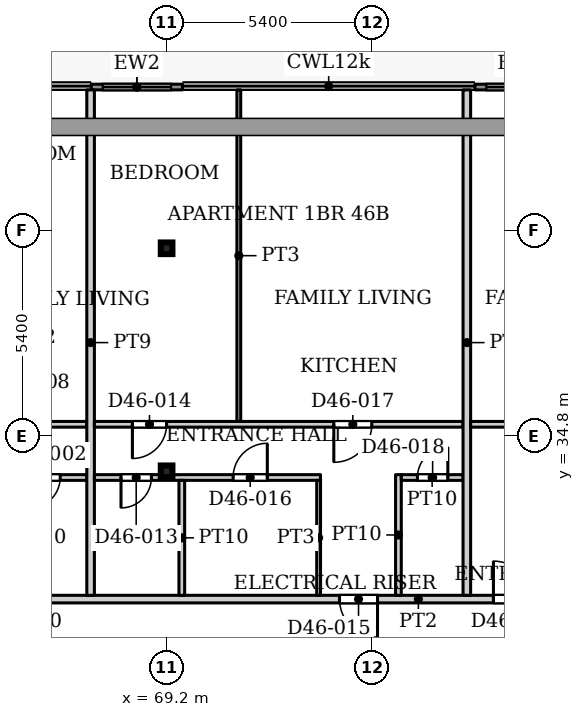
"""IFC4 building model, lengths in metres.
Left out: names, types, materials, properties, quantities, classifications, styles, units other than length and angle.
Written with IfcOpenShell. Run it as: python <this file> out.ifc"""

import sys

from ifc_helpers import new_model, si_unit, direction, frame, frame_2d, origin, origin_2d, place, context, subcontext, project, spatial, rectangle, hollow_rectangle, extrude, source, transform, mapped, element, fill, save


model = new_model("IFC4")
c1 = context("Model", 3, precision=1e-05, world=origin(), true_north=direction((0.0, 1.0)))
c2 = subcontext(c1, "Body", "Model", "MODEL_VIEW")
j1 = project(units=[si_unit("LENGTHUNIT", "METRE"), si_unit("PLANEANGLEUNIT", "RADIAN")], contexts=[c1])
p1 = place(None, origin())
s1 = spatial("IfcSite", under=j1, at=p1, CompositionType="ELEMENT")
p2 = place(p1, origin())
s2 = spatial("IfcBuilding", under=s1, at=p2, CompositionType="ELEMENT")
p3 = place(p2, frame((0.0, 0.0, 195.5)))
s3 = spatial("IfcBuildingStorey", under=s2, at=p3, CompositionType="ELEMENT", Elevation=195.5)
for number, where, z_axis, x_axis in (
    (1, (69.2, 33.863, 0.0), (0.0, 0.0, 1.0), (1.0, 0.0, 0.0)),
    (2, (69.2, 39.732, 0.0), (0.0, 0.0, 1.0), (1.0, 0.0, 0.0)),
):
    element("IfcColumn", number, at=place(p3, frame(where, z_axis=z_axis, x_axis=x_axis)), inside=s3, PredefinedType="COLUMN", context=c2, shape_type="SweptSolid", body=[
        extrude(hollow_rectangle(XDim=0.305, YDim=0.305, WallThickness=0.016, InnerFilletRadius=0.016, OuterFilletRadius=0.032, at=origin_2d()), origin(), (0.0, 0.0, 1.0), 3.9),
    ])
p4 = place(p3, frame((67.218, 43.975, 0.0), z_axis=(0.0, 0.0, 1.0), x_axis=(1.0, 0.0, 0.0)))
e3 = element("IfcWall", 3, at=p4, inside=s3, PredefinedType="SOLIDWALL", context=c2, shape_type="SweptSolid", body=[
    extrude(rectangle(XDim=2.4, YDim=0.15, at=frame_2d((1.2, 0.0))), origin(), (0.0, 0.0, 1.0), 3.75),
])
p5 = place(p4, frame((0.3, 0.0, 0.0)))
e4 = element("IfcOpeningElement", 4, at=p5, cuts=e3, PredefinedType="OPENING", context=c2, shape_type="SweptSolid", body=[
    extrude(rectangle(XDim=1.8, YDim=2.4, at=frame_2d((0.9, 1.2))), frame((0.0, 0.085, 0.0), z_axis=(0.0, -1.0, 0.0), x_axis=(1.0, 0.0, 0.0)), (0.0, 0.0, 1.0), 0.17),
])
p6 = place(p3, frame((77.312, 43.975, 0.0), z_axis=(0.0, 0.0, 1.0), x_axis=(1.0, 0.0, 0.0)))
e5 = element("IfcWall", 5, at=p6, inside=s3, PredefinedType="SOLIDWALL", context=c2, shape_type="SweptSolid", body=[
    extrude(rectangle(XDim=2.4, YDim=0.15, at=frame_2d((1.2, 0.0))), origin(), (0.0, 0.0, 1.0), 3.75),
])
p7 = place(p6, frame((0.3, 0.0, 0.0)))
e6 = element("IfcOpeningElement", 6, at=p7, cuts=e5, PredefinedType="OPENING", context=c2, shape_type="SweptSolid", body=[
    extrude(rectangle(XDim=1.8, YDim=2.4, at=frame_2d((0.9, 1.2))), frame((0.0, 0.085, 0.0), z_axis=(0.0, -1.0, 0.0), x_axis=(1.0, 0.0, 0.0)), (0.0, 0.0, 1.0), 0.17),
])
p8 = place(p3, frame((53.549, 30.5, 0.0), z_axis=(0.0, 0.0, 1.0), x_axis=(1.0, 0.0, 0.0)))
e7 = element("IfcWall", 7, at=p8, inside=s3, PredefinedType="PARTITIONING", context=c2, shape_type="SweptSolid", body=[
    extrude(rectangle(XDim=44.551, YDim=0.2, at=frame_2d((22.275, 0.0))), origin(), (0.0, 0.0, 1.0), 3.6),
])
p9 = place(p8, frame((5.501, 0.0, 0.0)))
e8 = element("IfcOpeningElement", 8, at=p9, cuts=e7, PredefinedType="OPENING", context=c2, shape_type="SweptSolid", body=[
    extrude(rectangle(XDim=1.0, YDim=2.1, at=frame_2d((0.5, 1.05))), frame((0.0, 0.11, 0.0), z_axis=(0.0, -1.0, 0.0), x_axis=(1.0, 0.0, 0.0)), (0.0, 0.0, 1.0), 0.22),
])
p10 = place(p8, frame((20.201, 0.0, 0.0)))
e9 = element("IfcOpeningElement", 9, at=p10, cuts=e7, PredefinedType="OPENING", context=c2, shape_type="SweptSolid", body=[
    extrude(rectangle(XDim=1.0, YDim=2.1, at=frame_2d((0.5, 1.05))), frame((0.0, 0.11, 0.0), z_axis=(0.0, -1.0, 0.0), x_axis=(1.0, 0.0, 0.0)), (0.0, 0.0, 1.0), 0.22),
])
p11 = place(p8, frame((24.251, 0.0, 0.0)))
e10 = element("IfcOpeningElement", 10, at=p11, cuts=e7, PredefinedType="OPENING", context=c2, shape_type="SweptSolid", body=[
    extrude(rectangle(XDim=1.0, YDim=2.1, at=frame_2d((0.5, 1.05))), frame((0.0, 0.11, 0.0), z_axis=(0.0, -1.0, 0.0), x_axis=(1.0, 0.0, 0.0)), (0.0, 0.0, 1.0), 0.22),
])
p12 = place(p8, frame((40.151, 0.0, 0.0)))
e11 = element("IfcOpeningElement", 11, at=p12, cuts=e7, PredefinedType="OPENING", context=c2, shape_type="SweptSolid", body=[
    extrude(rectangle(XDim=1.0, YDim=2.1, at=frame_2d((0.5, 1.05))), frame((0.0, 0.11, 0.0), z_axis=(0.0, -1.0, 0.0), x_axis=(1.0, 0.0, 0.0)), (0.0, 0.0, 1.0), 0.22),
])
p13 = place(p3, frame((53.549, 35.1, 0.0), z_axis=(0.0, 0.0, 1.0), x_axis=(1.0, 0.0, 0.0)))
e12 = element("IfcWall", 12, at=p13, inside=s3, PredefinedType="PARTITIONING", context=c2, shape_type="SweptSolid", body=[
    extrude(rectangle(XDim=13.551, YDim=0.15, at=frame_2d((6.775, 0.0))), origin(), (0.0, 0.0, 1.0), 3.6),
])
p14 = place(p13, frame((3.901, 0.0, 0.0)))
e13 = element("IfcOpeningElement", 13, at=p14, cuts=e12, PredefinedType="OPENING", context=c2, shape_type="SweptSolid", body=[
    extrude(rectangle(XDim=0.9, YDim=2.1, at=frame_2d((0.45, 1.05))), frame((0.0, 0.085, 0.0), z_axis=(0.0, -1.0, 0.0), x_axis=(1.0, 0.0, 0.0)), (0.0, 0.0, 1.0), 0.17),
])
p15 = place(p13, frame((8.701, 0.0, 0.0)))
e14 = element("IfcOpeningElement", 14, at=p15, cuts=e12, PredefinedType="OPENING", context=c2, shape_type="SweptSolid", body=[
    extrude(rectangle(XDim=0.9, YDim=2.1, at=frame_2d((0.45, 1.05))), frame((0.0, 0.085, 0.0), z_axis=(0.0, -1.0, 0.0), x_axis=(1.0, 0.0, 0.0)), (0.0, 0.0, 1.0), 0.17),
])
p16 = place(p13, frame((11.501, 0.0, 0.0)))
e15 = element("IfcOpeningElement", 15, at=p16, cuts=e12, PredefinedType="OPENING", context=c2, shape_type="SweptSolid", body=[
    extrude(rectangle(XDim=1.0, YDim=2.1, at=frame_2d((0.5, 1.05))), frame((0.0, 0.085, 0.0), z_axis=(0.0, -1.0, 0.0), x_axis=(1.0, 0.0, 0.0)), (0.0, 0.0, 1.0), 0.17),
])
p17 = place(p13, frame((6.301, 0.0, 0.0)))
e16 = element("IfcOpeningElement", 16, at=p17, cuts=e12, PredefinedType="OPENING", context=c2, shape_type="SweptSolid", body=[
    extrude(rectangle(XDim=0.9, YDim=2.1, at=frame_2d((0.45, 1.05))), frame((0.0, 0.085, 0.0), z_axis=(0.0, -1.0, 0.0), x_axis=(1.0, 0.0, 0.0)), (0.0, 0.0, 1.0), 0.17),
])
p18 = place(p13, frame((0.15, 0.0, 0.0)))
e17 = element("IfcOpeningElement", 17, at=p18, cuts=e12, PredefinedType="OPENING", context=c2, shape_type="SweptSolid", body=[
    extrude(rectangle(XDim=0.7, YDim=2.1, at=frame_2d((0.35, 1.05))), frame((0.0, 0.085, 0.0), z_axis=(0.0, -1.0, 0.0), x_axis=(1.0, 0.0, 0.0)), (0.0, 0.0, 1.0), 0.17),
])
p19 = place(p3, frame((60.525, 33.7, 0.0), z_axis=(0.0, 0.0, 1.0), x_axis=(1.0, 0.0, 0.0)))
e18 = element("IfcWall", 18, at=p19, inside=s3, PredefinedType="PARTITIONING", context=c2, shape_type="SweptSolid", body=[
    extrude(rectangle(XDim=6.575, YDim=0.15, at=frame_2d((3.288, 0.0))), origin(), (0.0, 0.0, 1.0), 3.6),
])
p20 = place(p19, frame((2.675, 0.0, 0.0)))
e19 = element("IfcOpeningElement", 19, at=p20, cuts=e18, PredefinedType="OPENING", context=c2, shape_type="SweptSolid", body=[
    extrude(rectangle(XDim=0.8, YDim=2.1, at=frame_2d((0.4, 1.05))), frame((0.0, 0.085, 0.0), z_axis=(0.0, -1.0, 0.0), x_axis=(1.0, 0.0, 0.0)), (0.0, 0.0, 1.0), 0.17),
])
p21 = place(p19, frame((5.075, 0.0, 0.0)))
e20 = element("IfcOpeningElement", 20, at=p21, cuts=e18, PredefinedType="OPENING", context=c2, shape_type="SweptSolid", body=[
    extrude(rectangle(XDim=0.8, YDim=2.1, at=frame_2d((0.4, 1.05))), frame((0.0, 0.085, 0.0), z_axis=(0.0, -1.0, 0.0), x_axis=(1.0, 0.0, 0.0)), (0.0, 0.0, 1.0), 0.17),
])
p22 = place(p19, frame((0.575, 0.0, 0.0)))
e21 = element("IfcOpeningElement", 21, at=p22, cuts=e18, PredefinedType="OPENING", context=c2, shape_type="SweptSolid", body=[
    extrude(rectangle(XDim=0.8, YDim=2.1, at=frame_2d((0.4, 1.05))), frame((0.0, 0.085, 0.0), z_axis=(0.0, -1.0, 0.0), x_axis=(1.0, 0.0, 0.0)), (0.0, 0.0, 1.0), 0.17),
])
p23 = place(p3, frame((67.2, 30.6, 0.0), z_axis=(0.0, 0.0, 1.0), x_axis=(0.0, 1.0, 0.0)))
e22 = element("IfcWall", 22, at=p23, inside=s3, PredefinedType="PARTITIONING", context=c2, shape_type="SweptSolid", body=[
    extrude(rectangle(XDim=13.3, YDim=0.2, at=frame_2d((6.65, 0.0))), origin(), (0.0, 0.0, 1.0), 3.6),
])
p24 = place(p3, frame((67.3, 33.7, 0.0), z_axis=(0.0, 0.0, 1.0), x_axis=(1.0, 0.0, 0.0)))
e23 = element("IfcWall", 23, at=p24, inside=s3, PredefinedType="PARTITIONING", context=c2, shape_type="SweptSolid", body=[
    extrude(rectangle(XDim=5.95, YDim=0.15, at=frame_2d((2.975, 0.0))), origin(), (0.0, 0.0, 1.0), 3.6),
])
p25 = place(p24, frame((0.7, 0.0, 0.0)))
e24 = element("IfcOpeningElement", 24, at=p25, cuts=e23, PredefinedType="OPENING", context=c2, shape_type="SweptSolid", body=[
    extrude(rectangle(XDim=0.8, YDim=2.1, at=frame_2d((0.4, 1.05))), frame((0.0, 0.085, 0.0), z_axis=(0.0, -1.0, 0.0), x_axis=(1.0, 0.0, 0.0)), (0.0, 0.0, 1.0), 0.17),
])
p26 = place(p24, frame((3.65, 0.0, 0.0)))
e25 = element("IfcOpeningElement", 25, at=p26, cuts=e23, PredefinedType="OPENING", context=c2, shape_type="SweptSolid", body=[
    extrude(rectangle(XDim=0.9, YDim=2.1, at=frame_2d((0.45, 1.05))), frame((0.0, 0.085, 0.0), z_axis=(0.0, -1.0, 0.0), x_axis=(1.0, 0.0, 0.0)), (0.0, 0.0, 1.0), 0.17),
])
p27 = place(p3, frame((67.3, 35.1, 0.0), z_axis=(0.0, 0.0, 1.0), x_axis=(1.0, 0.0, 0.0)))
e26 = element("IfcWall", 26, at=p27, inside=s3, PredefinedType="PARTITIONING", context=c2, shape_type="SweptSolid", body=[
    extrude(rectangle(XDim=9.7, YDim=0.15, at=frame_2d((4.85, 0.0))), origin(), (0.0, 0.0, 1.0), 3.6),
])
p28 = place(p27, frame((1.0, 0.0, 0.0)))
e27 = element("IfcOpeningElement", 27, at=p28, cuts=e26, PredefinedType="OPENING", context=c2, shape_type="SweptSolid", body=[
    extrude(rectangle(XDim=0.9, YDim=2.1, at=frame_2d((0.45, 1.05))), frame((0.0, 0.085, 0.0), z_axis=(0.0, -1.0, 0.0), x_axis=(1.0, 0.0, 0.0)), (0.0, 0.0, 1.0), 0.17),
])
p29 = place(p27, frame((6.3, 0.0, 0.0)))
e28 = element("IfcOpeningElement", 28, at=p29, cuts=e26, PredefinedType="OPENING", context=c2, shape_type="SweptSolid", body=[
    extrude(rectangle(XDim=1.0, YDim=2.1, at=frame_2d((0.5, 1.05))), frame((0.0, 0.085, 0.0), z_axis=(0.0, -1.0, 0.0), x_axis=(1.0, 0.0, 0.0)), (0.0, 0.0, 1.0), 0.17),
])
p30 = place(p3, frame((69.6, 30.6, 0.0), z_axis=(0.0, 0.0, 1.0), x_axis=(0.0, 1.0, 0.0)))
e29 = element("IfcWall", 29, at=p30, inside=s3, PredefinedType="PARTITIONING", context=c2, shape_type="SweptSolid", body=[
    extrude(rectangle(XDim=3.025, YDim=0.15, at=frame_2d((1.512, 0.0))), origin(), (0.0, 0.0, 1.0), 3.6),
])
p31 = place(p3, frame((71.1, 35.175, 0.0), z_axis=(0.0, 0.0, 1.0), x_axis=(0.0, 1.0, 0.0)))
e30 = element("IfcWall", 30, at=p31, inside=s3, PredefinedType="PARTITIONING", context=c2, shape_type="SweptSolid", body=[
    extrude(rectangle(XDim=8.725, YDim=0.1, at=frame_2d((4.362, 0.0))), origin(), (0.0, 0.0, 1.0), 3.6),
])
p32 = place(p3, frame((73.2, 30.6, 0.0), z_axis=(0.0, 0.0, 1.0), x_axis=(0.0, 1.0, 0.0)))
e31 = element("IfcWall", 31, at=p32, inside=s3, PredefinedType="PARTITIONING", context=c2, shape_type="SweptSolid", body=[
    extrude(rectangle(XDim=3.025, YDim=0.1, at=frame_2d((1.512, 0.0))), origin(), (0.0, 0.0, 1.0), 3.6),
])
p33 = place(p3, frame((75.3, 30.6, 0.0), z_axis=(0.0, 0.0, 1.0), x_axis=(0.0, 1.0, 0.0)))
e32 = element("IfcWall", 32, at=p33, inside=s3, PredefinedType="PARTITIONING", context=c2, shape_type="SweptSolid", body=[
    extrude(rectangle(XDim=3.175, YDim=0.15, at=frame_2d((1.587, 0.0))), origin(), (0.0, 0.0, 1.0), 3.6),
])
p34 = place(p3, frame((75.375, 33.7, 0.0), z_axis=(0.0, 0.0, 1.0), x_axis=(1.0, 0.0, 0.0)))
e33 = element("IfcWall", 33, at=p34, inside=s3, PredefinedType="PARTITIONING", context=c2, shape_type="SweptSolid", body=[
    extrude(rectangle(XDim=1.625, YDim=0.15, at=frame_2d((0.812, 0.0))), origin(), (0.0, 0.0, 1.0), 3.6),
])
p35 = place(p34, frame((0.425, 0.0, 0.0)))
e34 = element("IfcOpeningElement", 34, at=p35, cuts=e33, PredefinedType="OPENING", context=c2, shape_type="SweptSolid", body=[
    extrude(rectangle(XDim=0.8, YDim=2.1, at=frame_2d((0.4, 1.05))), frame((0.0, 0.085, 0.0), z_axis=(0.0, -1.0, 0.0), x_axis=(1.0, 0.0, 0.0)), (0.0, 0.0, 1.0), 0.17),
])
p36 = place(p3, frame((77.1, 30.6, 0.0), z_axis=(0.0, 0.0, 1.0), x_axis=(0.0, 1.0, 0.0)))
e35 = element("IfcWall", 35, at=p36, inside=s3, PredefinedType="PARTITIONING", context=c2, shape_type="SweptSolid", body=[
    extrude(rectangle(XDim=13.3, YDim=0.2, at=frame_2d((6.65, 0.0))), origin(), (0.0, 0.0, 1.0), 3.6),
])
p37 = place(p3, frame((77.2, 35.1, 0.0), z_axis=(0.0, 0.0, 1.0), x_axis=(1.0, 0.0, 0.0)))
e36 = element("IfcWall", 36, at=p37, inside=s3, PredefinedType="PARTITIONING", context=c2, shape_type="SweptSolid", body=[
    extrude(rectangle(XDim=11.8, YDim=0.15, at=frame_2d((5.9, 0.0))), origin(), (0.0, 0.0, 1.0), 3.6),
])
p38 = place(p37, frame((6.2, 0.0, 0.0)))
e37 = element("IfcOpeningElement", 37, at=p38, cuts=e36, PredefinedType="OPENING", context=c2, shape_type="SweptSolid", body=[
    extrude(rectangle(XDim=0.9, YDim=2.1, at=frame_2d((0.45, 1.05))), frame((0.0, 0.085, 0.0), z_axis=(0.0, -1.0, 0.0), x_axis=(1.0, 0.0, 0.0)), (0.0, 0.0, 1.0), 0.17),
])
p39 = place(p37, frame((1.95, 0.0, 0.0)))
e38 = element("IfcOpeningElement", 38, at=p39, cuts=e36, PredefinedType="OPENING", context=c2, shape_type="SweptSolid", body=[
    extrude(rectangle(XDim=1.0, YDim=2.1, at=frame_2d((0.5, 1.05))), frame((0.0, 0.085, 0.0), z_axis=(0.0, -1.0, 0.0), x_axis=(1.0, 0.0, 0.0)), (0.0, 0.0, 1.0), 0.17),
])
p40 = place(p37, frame((10.7, 0.0, 0.0)))
e39 = element("IfcOpeningElement", 39, at=p40, cuts=e36, PredefinedType="OPENING", context=c2, shape_type="SweptSolid", body=[
    extrude(rectangle(XDim=0.9, YDim=2.1, at=frame_2d((0.45, 1.05))), frame((0.0, 0.085, 0.0), z_axis=(0.0, -1.0, 0.0), x_axis=(1.0, 0.0, 0.0)), (0.0, 0.0, 1.0), 0.17),
])
m1 = source(origin(), c2, "Body", "SweptSolid", [
    extrude(rectangle(XDim=1.8, YDim=2.4, at=frame_2d((0.9, 1.2))), frame((0.0, 0.025, 0.0), z_axis=(0.0, -1.0, 0.0), x_axis=(1.0, 0.0, 0.0)), (0.0, 0.0, 1.0), 0.05),
])
p41 = place(p5, origin())
e40 = element("IfcDoor", 40, at=p41, inside=s3, OperationType="SLIDING_TO_LEFT", PredefinedType="DOOR", context=c2, shape_type="MappedRepresentation", body=[
    mapped(m1, transform((0.0, 0.0, 0.0), x_axis=(1.0, 0.0, 0.0), y_axis=(0.0, 1.0, 0.0), z_axis=(0.0, 0.0, 1.0), scale=1.0)),
])
fill(e4, e40)
p42 = place(p7, origin())
e41 = element("IfcDoor", 41, at=p42, inside=s3, OperationType="SLIDING_TO_LEFT", PredefinedType="DOOR", context=c2, shape_type="MappedRepresentation", body=[
    mapped(m1, transform((0.0, 0.0, 0.0), x_axis=(1.0, 0.0, 0.0), y_axis=(0.0, 1.0, 0.0), z_axis=(0.0, 0.0, 1.0), scale=1.0)),
])
fill(e6, e41)
m2 = source(origin(), c2, "Body", "SweptSolid", [
    extrude(rectangle(XDim=0.8, YDim=2.1, at=frame_2d((0.4, 1.05))), frame((0.0, 0.025, 0.0), z_axis=(0.0, -1.0, 0.0), x_axis=(1.0, 0.0, 0.0)), (0.0, 0.0, 1.0), 0.05),
])
p43 = place(p21, origin())
e42 = element("IfcDoor", 42, at=p43, inside=s3, OperationType="SINGLE_SWING_RIGHT", PredefinedType="DOOR", context=c2, shape_type="MappedRepresentation", body=[
    mapped(m2, transform((0.0, 0.0, 0.0), x_axis=(1.0, 0.0, 0.0), y_axis=(0.0, 1.0, 0.0), z_axis=(0.0, 0.0, 1.0), scale=1.0)),
])
fill(e20, e42)
p44 = place(p25, origin())
e43 = element("IfcDoor", 43, at=p44, inside=s3, OperationType="SINGLE_SWING_RIGHT", PredefinedType="DOOR", context=c2, shape_type="MappedRepresentation", body=[
    mapped(m2, transform((0.0, 0.0, 0.0), x_axis=(1.0, 0.0, 0.0), y_axis=(0.0, 1.0, 0.0), z_axis=(0.0, 0.0, 1.0), scale=1.0)),
])
fill(e24, e43)
m3 = source(origin(), c2, "Body", "SweptSolid", [
    extrude(rectangle(XDim=0.9, YDim=2.1, at=frame_2d((0.45, 1.05))), frame((0.0, 0.025, 0.0), z_axis=(0.0, -1.0, 0.0), x_axis=(1.0, 0.0, 0.0)), (0.0, 0.0, 1.0), 0.05),
])
p45 = place(p28, origin())
e44 = element("IfcDoor", 44, at=p45, inside=s3, OperationType="SINGLE_SWING_RIGHT", PredefinedType="DOOR", context=c2, shape_type="MappedRepresentation", body=[
    mapped(m3, transform((0.0, 0.0, 0.0), x_axis=(1.0, 0.0, 0.0), y_axis=(0.0, 1.0, 0.0), z_axis=(0.0, 0.0, 1.0), scale=1.0)),
])
fill(e27, e44)
m4 = source(origin(), c2, "Body", "SweptSolid", [
    extrude(rectangle(XDim=1.0, YDim=2.1, at=frame_2d((0.5, 1.05))), frame((0.0, 0.025, 0.0), z_axis=(0.0, -1.0, 0.0), x_axis=(1.0, 0.0, 0.0)), (0.0, 0.0, 1.0), 0.05),
])
p46 = place(p10, origin())
e45 = element("IfcDoor", 45, at=p46, inside=s3, OperationType="SINGLE_SWING_RIGHT", PredefinedType="DOOR", context=c2, shape_type="MappedRepresentation", body=[
    mapped(m4, transform((0.0, 0.0, 0.0), x_axis=(1.0, 0.0, 0.0), y_axis=(0.0, 1.0, 0.0), z_axis=(0.0, 0.0, 1.0), scale=1.0)),
])
fill(e9, e45)
p47 = place(p26, origin())
e46 = element("IfcDoor", 46, at=p47, inside=s3, OperationType="SINGLE_SWING_LEFT", PredefinedType="DOOR", context=c2, shape_type="MappedRepresentation", body=[
    mapped(m3, transform((0.0, 0.0, 0.0), x_axis=(1.0, 0.0, 0.0), y_axis=(0.0, 1.0, 0.0), z_axis=(0.0, 0.0, 1.0), scale=1.0)),
])
fill(e25, e46)
m5 = source(origin(), c2, "Body", "SweptSolid", [
    extrude(rectangle(XDim=1.0, YDim=2.1, at=frame_2d((0.5, 1.05))), frame((0.0, 0.025, 0.0), z_axis=(0.0, -1.0, 0.0), x_axis=(1.0, 0.0, 0.0)), (0.0, 0.0, 1.0), 0.05),
])
p48 = place(p29, origin())
e47 = element("IfcDoor", 47, at=p48, inside=s3, OperationType="SINGLE_SWING_RIGHT", PredefinedType="DOOR", context=c2, shape_type="MappedRepresentation", body=[
    mapped(m5, transform((0.0, 0.0, 0.0), x_axis=(1.0, 0.0, 0.0), y_axis=(0.0, 1.0, 0.0), z_axis=(0.0, 0.0, 1.0), scale=1.0)),
])
fill(e28, e47)
p49 = place(p35, origin())
e48 = element("IfcDoor", 48, at=p49, inside=s3, OperationType="SINGLE_SWING_LEFT", PredefinedType="DOOR", context=c2, shape_type="MappedRepresentation", body=[
    mapped(m2, transform((0.0, 0.0, 0.0), x_axis=(1.0, 0.0, 0.0), y_axis=(0.0, 1.0, 0.0), z_axis=(0.0, 0.0, 1.0), scale=1.0)),
])
fill(e34, e48)
p50 = place(p11, origin())
e49 = element("IfcDoor", 49, at=p50, inside=s3, OperationType="SINGLE_SWING_LEFT", PredefinedType="DOOR", context=c2, shape_type="MappedRepresentation", body=[
    mapped(m4, transform((0.0, 0.0, 0.0), x_axis=(1.0, 0.0, 0.0), y_axis=(0.0, 1.0, 0.0), z_axis=(0.0, 0.0, 1.0), scale=1.0)),
])
fill(e10, e49)
save(model, sys.argv[1])
